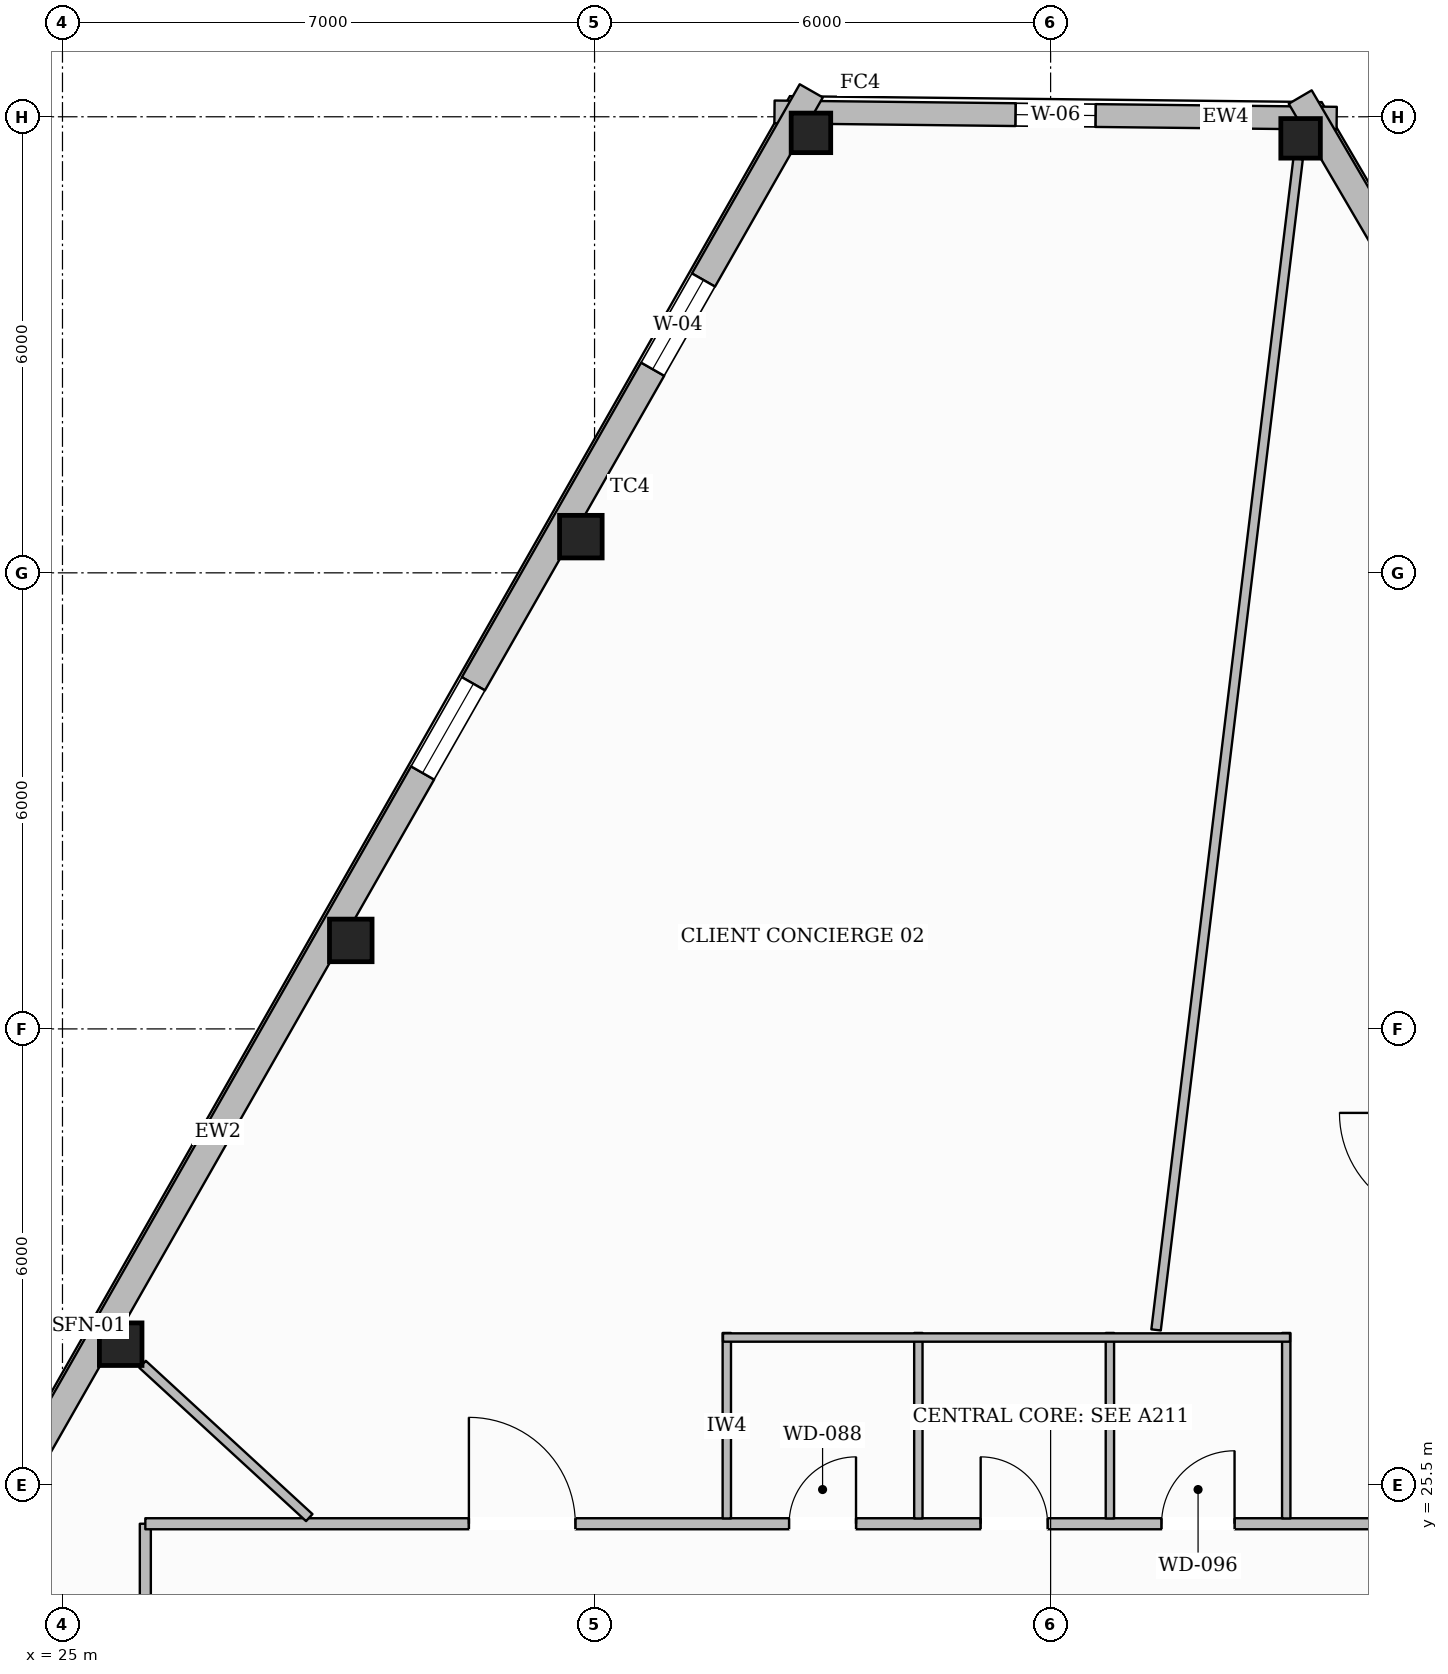
"""IFC4 building model, lengths in metres.
Left out: names, types, materials, properties, quantities, classifications, styles, units other than length and angle.
Written with IfcOpenShell. Run it as: python <this file> out.ifc"""

import sys

from ifc_helpers import new_model, si_unit, direction, frame, frame_2d, origin, origin_2d, place, context, subcontext, project, spatial, rectangle, hollow_rectangle, extrude, element, fill, save


model = new_model("IFC4")
c1 = context("Model", 3, precision=1e-05, world=origin(), true_north=direction((0.0, 1.0)))
c2 = subcontext(c1, "Body", "Model", "MODEL_VIEW")
j1 = project(units=[si_unit("LENGTHUNIT", "METRE"), si_unit("PLANEANGLEUNIT", "RADIAN")], contexts=[c1])
p1 = place(None, origin())
s1 = spatial("IfcSite", under=j1, at=p1, CompositionType="ELEMENT")
p2 = place(p1, origin())
s2 = spatial("IfcBuilding", under=s1, at=p2, CompositionType="ELEMENT")
p3 = place(p2, frame((0.0, 0.0, 254.9)))
s3 = spatial("IfcBuildingStorey", under=s2, at=p3, CompositionType="ELEMENT", Elevation=254.9)
p4 = place(p3, frame((34.847, 43.288, 0.0), z_axis=(0.0, 0.0, 1.0), x_axis=(1.0, 0.0, 0.0)))
e1 = element("IfcColumn", 1, at=p4, inside=s3, PredefinedType="COLUMN", context=c2, shape_type="SweptSolid", body=[
    extrude(hollow_rectangle(XDim=0.52, YDim=0.52, WallThickness=0.024, at=origin_2d()), origin(), (0.0, 0.0, 1.0), 3.61),
])
for number, where, z_axis, x_axis in (
    (2, (31.82, 37.976, 0.0), (0.0, 0.0, 1.0), (1.0, 0.0, 0.0)),
    (3, (28.793, 32.664, 0.0), (0.0, 0.0, 1.0), (1.0, 0.0, 0.0)),
    (4, (25.766, 27.352, 0.0), (0.0, 0.0, 1.0), (1.0, 0.0, 0.0)),
):
    element("IfcColumn", number, at=place(p3, frame(where, z_axis=z_axis, x_axis=x_axis)), inside=s3, PredefinedType="COLUMN", context=c2, shape_type="SweptSolid", body=[
        extrude(hollow_rectangle(XDim=0.56, YDim=0.56, WallThickness=0.025, at=origin_2d()), origin(), (0.0, 0.0, 1.0), 3.61),
    ])
p5 = place(p3, frame((41.289, 43.216, 0.0), z_axis=(0.0, 0.0, 1.0), x_axis=(1.0, 0.0, 0.0)))
e5 = element("IfcColumn", 5, at=p5, inside=s3, PredefinedType="COLUMN", context=c2, shape_type="SweptSolid", body=[
    extrude(hollow_rectangle(XDim=0.52, YDim=0.52, WallThickness=0.024, at=origin_2d()), origin(), (0.0, 0.0, 1.0), 3.61),
])
p6 = place(p3, frame((34.367, 43.564, 0.0), z_axis=(0.0, 0.0, 1.0), x_axis=(0.999937028375, -0.011222267359, 0.0)))
e6 = element("IfcWall", 6, at=p6, inside=s3, PredefinedType="STANDARD", context=c2, shape_type="SweptSolid", body=[
    extrude(rectangle(XDim=7.397, YDim=0.3, at=frame_2d((3.698, 0.0))), origin(), (0.0, 0.0, 1.0), 3.196),
])
p7 = place(p6, frame((3.173, 0.0, 0.65)))
e7 = element("IfcOpeningElement", 7, at=p7, cuts=e6, PredefinedType="OPENING", context=c2, shape_type="SweptSolid", body=[
    extrude(rectangle(XDim=1.05, YDim=1.7, at=frame_2d((0.525, 0.85))), frame((0.0, 0.16, 0.0), z_axis=(0.0, -1.0, 0.0), x_axis=(1.0, 0.0, 0.0)), (0.0, 0.0, 1.0), 0.32),
])
p8 = place(p3, frame((16.214, 11.135, 0.0), z_axis=(0.0, 0.0, 1.0), x_axis=(0.49510347201, 0.868834018673, 0.0)))
e8 = element("IfcWall", 8, at=p8, inside=s3, PredefinedType="STANDARD", context=c2, shape_type="SweptSolid", body=[
    extrude(rectangle(XDim=37.643, YDim=0.35, at=frame_2d((18.822, 0.0))), origin(), (0.0, 0.0, 1.0), 3.196),
])
p9 = place(p8, frame((33.429, 0.0, 0.65)))
e9 = element("IfcOpeningElement", 9, at=p9, cuts=e8, PredefinedType="OPENING", context=c2, shape_type="SweptSolid", body=[
    extrude(rectangle(XDim=1.35, YDim=1.75, at=frame_2d((0.675, 0.875))), frame((0.0, 0.185, 0.0), z_axis=(0.0, -1.0, 0.0), x_axis=(1.0, 0.0, 0.0)), (0.0, 0.0, 1.0), 0.37),
])
p10 = place(p8, frame((27.315, 0.0, 0.65)))
e10 = element("IfcOpeningElement", 10, at=p10, cuts=e8, PredefinedType="OPENING", context=c2, shape_type="SweptSolid", body=[
    extrude(rectangle(XDim=1.35, YDim=1.75, at=frame_2d((0.675, 0.875))), frame((0.0, 0.185, 0.0), z_axis=(0.0, -1.0, 0.0), x_axis=(1.0, 0.0, 0.0)), (0.0, 0.0, 1.0), 0.37),
])
p11 = place(p8, frame((15.087, 0.0, 0.65)))
e11 = element("IfcOpeningElement", 11, at=p11, cuts=e8, PredefinedType="OPENING", context=c2, shape_type="SweptSolid", body=[
    extrude(rectangle(XDim=1.35, YDim=1.75, at=frame_2d((0.675, 0.875))), frame((0.0, 0.185, 0.0), z_axis=(0.0, -1.0, 0.0), x_axis=(1.0, 0.0, 0.0)), (0.0, 0.0, 1.0), 0.37),
])
p12 = place(p8, frame((8.973, 0.0, 0.65)))
e12 = element("IfcOpeningElement", 12, at=p12, cuts=e8, PredefinedType="OPENING", context=c2, shape_type="SweptSolid", body=[
    extrude(rectangle(XDim=1.35, YDim=1.75, at=frame_2d((0.675, 0.875))), frame((0.0, 0.185, 0.0), z_axis=(0.0, -1.0, 0.0), x_axis=(1.0, 0.0, 0.0)), (0.0, 0.0, 1.0), 0.37),
])
p13 = place(p8, frame((2.859, 0.0, 0.65)))
e13 = element("IfcOpeningElement", 13, at=p13, cuts=e8, PredefinedType="OPENING", context=c2, shape_type="SweptSolid", body=[
    extrude(rectangle(XDim=1.35, YDim=1.75, at=frame_2d((0.675, 0.875))), frame((0.0, 0.185, 0.0), z_axis=(0.0, -1.0, 0.0), x_axis=(1.0, 0.0, 0.0)), (0.0, 0.0, 1.0), 0.37),
])
p14 = place(p3, frame((41.284, 43.76, 0.0), z_axis=(0.0, 0.0, 1.0), x_axis=(0.50479404613, -0.863239810824, 0.0)))
e14 = element("IfcWall", 14, at=p14, inside=s3, PredefinedType="STANDARD", context=c2, shape_type="SweptSolid", body=[
    extrude(rectangle(XDim=38.372, YDim=0.35, at=frame_2d((19.186, 0.0))), origin(), (0.0, 0.0, 1.0), 3.196),
])
p15 = place(p14, frame((34.102, 0.0, 0.65)))
e15 = element("IfcOpeningElement", 15, at=p15, cuts=e14, PredefinedType="OPENING", context=c2, shape_type="SweptSolid", body=[
    extrude(rectangle(XDim=1.35, YDim=1.75, at=frame_2d((0.675, 0.875))), frame((0.0, 0.185, 0.0), z_axis=(0.0, -1.0, 0.0), x_axis=(1.0, 0.0, 0.0)), (0.0, 0.0, 1.0), 0.37),
])
p16 = place(p14, frame((27.864, 0.0, 0.65)))
e16 = element("IfcOpeningElement", 16, at=p16, cuts=e14, PredefinedType="OPENING", context=c2, shape_type="SweptSolid", body=[
    extrude(rectangle(XDim=1.35, YDim=1.75, at=frame_2d((0.675, 0.875))), frame((0.0, 0.185, 0.0), z_axis=(0.0, -1.0, 0.0), x_axis=(1.0, 0.0, 0.0)), (0.0, 0.0, 1.0), 0.37),
])
p17 = place(p14, frame((15.39, 0.0, 0.65)))
e17 = element("IfcOpeningElement", 17, at=p17, cuts=e14, PredefinedType="OPENING", context=c2, shape_type="SweptSolid", body=[
    extrude(rectangle(XDim=1.35, YDim=1.75, at=frame_2d((0.675, 0.875))), frame((0.0, 0.185, 0.0), z_axis=(0.0, -1.0, 0.0), x_axis=(1.0, 0.0, 0.0)), (0.0, 0.0, 1.0), 0.37),
])
p18 = place(p14, frame((9.153, 0.0, 0.65)))
e18 = element("IfcOpeningElement", 18, at=p18, cuts=e14, PredefinedType="OPENING", context=c2, shape_type="SweptSolid", body=[
    extrude(rectangle(XDim=1.35, YDim=1.75, at=frame_2d((0.675, 0.875))), frame((0.0, 0.185, 0.0), z_axis=(0.0, -1.0, 0.0), x_axis=(1.0, 0.0, 0.0)), (0.0, 0.0, 1.0), 0.37),
])
p19 = place(p14, frame((2.915, 0.0, 0.65)))
e19 = element("IfcOpeningElement", 19, at=p19, cuts=e14, PredefinedType="OPENING", context=c2, shape_type="SweptSolid", body=[
    extrude(rectangle(XDim=1.35, YDim=1.75, at=frame_2d((0.675, 0.875))), frame((0.0, 0.185, 0.0), z_axis=(0.0, -1.0, 0.0), x_axis=(1.0, 0.0, 0.0)), (0.0, 0.0, 1.0), 0.37),
])
p20 = place(p3, frame((26.09, 7.21, 0.0), z_axis=(0.0, 0.0, 1.0), x_axis=(0.0, 1.0, 0.0)))
e20 = element("IfcWall", 20, at=p20, inside=s3, PredefinedType="PARTITIONING", context=c2, shape_type="SweptSolid", body=[
    extrude(rectangle(XDim=17.78, YDim=0.145, at=frame_2d((8.89, 0.0))), origin(), (0.0, 0.0, 1.0), 3.349),
])
p21 = place(p20, frame((11.443, 0.0, 0.0)))
e21 = element("IfcOpeningElement", 21, at=p21, cuts=e20, PredefinedType="OPENING", context=c2, shape_type="SweptSolid", body=[
    extrude(rectangle(XDim=0.98, YDim=2.15, at=frame_2d((0.49, 1.075))), frame((0.0, 0.083, 0.0), z_axis=(0.0, -1.0, 0.0), x_axis=(1.0, 0.0, 0.0)), (0.0, 0.0, 1.0), 0.165),
])
p22 = place(p3, frame((26.09, 24.99, 0.0), z_axis=(0.0, 0.0, 1.0), x_axis=(1.0, 0.0, 0.0)))
e22 = element("IfcWall", 22, at=p22, inside=s3, PredefinedType="PARTITIONING", context=c2, shape_type="SweptSolid", body=[
    extrude(rectangle(XDim=17.11, YDim=0.145, at=frame_2d((8.555, 0.0))), origin(), (0.0, 0.0, 1.0), 3.61),
])
p23 = place(p22, frame((8.47, 0.0, 0.0)))
e23 = element("IfcOpeningElement", 23, at=p23, cuts=e22, PredefinedType="OPENING", context=c2, shape_type="SweptSolid", body=[
    extrude(rectangle(XDim=0.88, YDim=2.1, at=frame_2d((0.44, 1.05))), frame((0.0, 0.083, 0.0), z_axis=(0.0, -1.0, 0.0), x_axis=(1.0, 0.0, 0.0)), (0.0, 0.0, 1.0), 0.165),
])
p24 = place(p22, frame((10.99, 0.0, 0.0)))
e24 = element("IfcOpeningElement", 24, at=p24, cuts=e22, PredefinedType="OPENING", context=c2, shape_type="SweptSolid", body=[
    extrude(rectangle(XDim=0.88, YDim=2.1, at=frame_2d((0.44, 1.05))), frame((0.0, 0.083, 0.0), z_axis=(0.0, -1.0, 0.0), x_axis=(1.0, 0.0, 0.0)), (0.0, 0.0, 1.0), 0.165),
])
p25 = place(p22, frame((13.37, 0.0, 0.0)))
e25 = element("IfcOpeningElement", 25, at=p25, cuts=e22, PredefinedType="OPENING", context=c2, shape_type="SweptSolid", body=[
    extrude(rectangle(XDim=0.96, YDim=2.1, at=frame_2d((0.48, 1.05))), frame((0.0, 0.083, 0.0), z_axis=(0.0, -1.0, 0.0), x_axis=(1.0, 0.0, 0.0)), (0.0, 0.0, 1.0), 0.165),
])
p26 = place(p22, frame((4.257, 0.0, 0.0)))
e26 = element("IfcOpeningElement", 26, at=p26, cuts=e22, PredefinedType="OPENING", context=c2, shape_type="SweptSolid", body=[
    extrude(rectangle(XDim=1.4, YDim=2.2, at=frame_2d((0.7, 1.1))), frame((0.0, 0.083, 0.0), z_axis=(0.0, -1.0, 0.0), x_axis=(1.0, 0.0, 0.0)), (0.0, 0.0, 1.0), 0.165),
])
for number, where, z_axis, x_axis in (
    (27, (33.74, 25.06, 0.0), (0.0, 0.0, 1.0), (0.0, 1.0, 0.0)),
    (28, (36.26, 25.06, 0.0), (0.0, 0.0, 1.0), (0.0, 1.0, 0.0)),
    (29, (38.78, 25.06, 0.0), (0.0, 0.0, 1.0), (0.0, 1.0, 0.0)),
    (30, (41.1, 25.06, 0.0), (0.0, 0.0, 1.0), (0.0, 1.0, 0.0)),
):
    element("IfcWall", number, at=place(p3, frame(where, z_axis=z_axis, x_axis=x_axis)), inside=s3, PredefinedType="PLUMBINGWALL", context=c2, shape_type="SweptSolid", body=[
        extrude(rectangle(XDim=2.44, YDim=0.11, at=frame_2d((1.22, 0.0))), origin(), (0.0, 0.0, 1.0), 3.61),
    ])
p27 = place(p3, frame((33.69, 27.44, 0.0), z_axis=(0.0, 0.0, 1.0), x_axis=(1.0, 0.0, 0.0)))
e31 = element("IfcWall", 31, at=p27, inside=s3, PredefinedType="PLUMBINGWALL", context=c2, shape_type="SweptSolid", body=[
    extrude(rectangle(XDim=7.46, YDim=0.11, at=frame_2d((3.73, 0.0))), origin(), (0.0, 0.0, 1.0), 3.61),
])
p28 = place(p3, frame((39.387, 27.54, 0.0), z_axis=(0.0, 0.0, 1.0), x_axis=(0.12041169592, 0.99272404196, 0.0)))
e32 = element("IfcWall", 32, at=p28, inside=s3, PredefinedType="PARTITIONING", context=c2, shape_type="SweptSolid", body=[
    extrude(rectangle(XDim=15.521, YDim=0.125, at=frame_2d((7.76, 0.0))), origin(), (0.0, 0.0, 1.0), 3.246),
])
p29 = place(p3, frame((28.247, 25.071, 0.0), z_axis=(0.0, 0.0, 1.0), x_axis=(-0.736030630255, 0.67694823386, 0.0)))
e33 = element("IfcWall", 33, at=p29, inside=s3, PredefinedType="PARTITIONING", context=c2, shape_type="SweptSolid", body=[
    extrude(rectangle(XDim=2.979, YDim=0.125, at=frame_2d((1.49, 0.0))), origin(), (0.0, 0.0, 1.0), 3.61),
])
p30 = place(p9, origin())
e34 = element("IfcWindow", 34, at=p30, inside=s3, PartitioningType="SINGLE_PANEL", PredefinedType="WINDOW", context=c2, shape_type="SweptSolid", body=[
    extrude(rectangle(XDim=1.35, YDim=1.75, at=frame_2d((0.675, 0.875))), frame((0.0, 0.03, 0.0), z_axis=(0.0, -1.0, 0.0), x_axis=(1.0, 0.0, 0.0)), (0.0, 0.0, 1.0), 0.06),
])
fill(e9, e34)
p31 = place(p10, origin())
e35 = element("IfcWindow", 35, at=p31, inside=s3, PartitioningType="SINGLE_PANEL", PredefinedType="WINDOW", context=c2, shape_type="SweptSolid", body=[
    extrude(rectangle(XDim=1.35, YDim=1.75, at=frame_2d((0.675, 0.875))), frame((0.0, 0.03, 0.0), z_axis=(0.0, -1.0, 0.0), x_axis=(1.0, 0.0, 0.0)), (0.0, 0.0, 1.0), 0.06),
])
fill(e10, e35)
p32 = place(p7, origin())
e36 = element("IfcWindow", 36, at=p32, inside=s3, PartitioningType="SINGLE_PANEL", PredefinedType="WINDOW", context=c2, shape_type="SweptSolid", body=[
    extrude(rectangle(XDim=1.05, YDim=1.7, at=frame_2d((0.525, 0.85))), frame((0.0, 0.03, 0.0), z_axis=(0.0, -1.0, 0.0), x_axis=(1.0, 0.0, 0.0)), (0.0, 0.0, 1.0), 0.06),
])
fill(e7, e36)
p33 = place(p23, origin())
e37 = element("IfcDoor", 37, at=p33, inside=s3, OperationType="SINGLE_SWING_RIGHT", PredefinedType="DOOR", context=c2, shape_type="SweptSolid", body=[
    extrude(rectangle(XDim=0.88, YDim=2.1, at=frame_2d((0.44, 1.05))), frame((0.0, 0.025, 0.0), z_axis=(0.0, -1.0, 0.0), x_axis=(1.0, 0.0, 0.0)), (0.0, 0.0, 1.0), 0.05),
])
fill(e23, e37)
p34 = place(p24, origin())
e38 = element("IfcDoor", 38, at=p34, inside=s3, OperationType="SINGLE_SWING_LEFT", PredefinedType="DOOR", context=c2, shape_type="SweptSolid", body=[
    extrude(rectangle(XDim=0.88, YDim=2.1, at=frame_2d((0.44, 1.05))), frame((0.0, 0.025, 0.0), z_axis=(0.0, -1.0, 0.0), x_axis=(1.0, 0.0, 0.0)), (0.0, 0.0, 1.0), 0.05),
])
fill(e24, e38)
p35 = place(p25, origin())
e39 = element("IfcDoor", 39, at=p35, inside=s3, OperationType="SINGLE_SWING_RIGHT", PredefinedType="DOOR", context=c2, shape_type="SweptSolid", body=[
    extrude(rectangle(XDim=0.96, YDim=2.1, at=frame_2d((0.48, 1.05))), frame((0.0, 0.025, 0.0), z_axis=(0.0, -1.0, 0.0), x_axis=(1.0, 0.0, 0.0)), (0.0, 0.0, 1.0), 0.05),
])
fill(e25, e39)
p36 = place(p26, origin())
e40 = element("IfcDoor", 40, at=p36, inside=s3, OperationType="SINGLE_SWING_LEFT", PredefinedType="DOOR", context=c2, shape_type="SweptSolid", body=[
    extrude(rectangle(XDim=1.4, YDim=2.2, at=frame_2d((0.7, 1.1))), frame((0.0, 0.025, 0.0), z_axis=(0.0, -1.0, 0.0), x_axis=(1.0, 0.0, 0.0)), (0.0, 0.0, 1.0), 0.05),
])
fill(e26, e40)
save(model, sys.argv[1])
